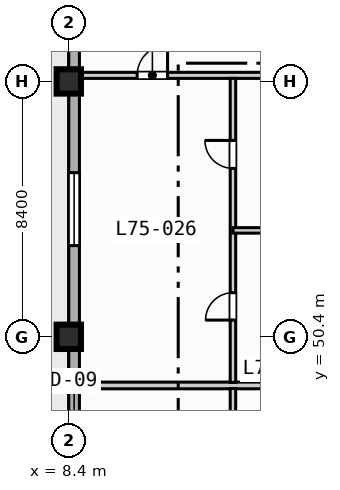
"""IFC4 building model, lengths in metres.
Left out: names, types, materials, properties, quantities, classifications, styles, units other than length and angle.
Written with IfcOpenShell. Run it as: python <this file> out.ifc"""

import sys

from ifc_helpers import new_model, si_unit, direction, frame, frame_2d, origin, origin_2d, place, context, subcontext, project, spatial, rectangle, extrude, element, fill, save


model = new_model("IFC4")
c1 = context("Model", 3, precision=1e-05, world=origin(), true_north=direction((0.0, 1.0)))
c2 = subcontext(c1, "Body", "Model", "MODEL_VIEW")
j1 = project(units=[si_unit("LENGTHUNIT", "METRE"), si_unit("PLANEANGLEUNIT", "RADIAN")], contexts=[c1])
p1 = place(None, origin())
s1 = spatial("IfcSite", under=j1, at=p1, CompositionType="ELEMENT")
p2 = place(p1, origin())
s2 = spatial("IfcBuilding", under=s1, at=p2, CompositionType="ELEMENT")
p3 = place(p2, frame((0.0, 0.0, 304.7)))
s3 = spatial("IfcBuildingStorey", under=s2, at=p3, CompositionType="ELEMENT", Elevation=304.7)
for number, where, z_axis, x_axis in (
    (1, (8.4, 50.4, 0.0), (0.0, 0.0, 1.0), (1.0, 0.0, 0.0)),
    (2, (8.4, 58.8, 0.0), (0.0, 0.0, 1.0), (1.0, 0.0, 0.0)),
):
    element("IfcColumn", number, at=place(p3, frame(where, z_axis=z_axis, x_axis=x_axis)), inside=s3, PredefinedType="COLUMN", context=c2, shape_type="SweptSolid", body=[
        extrude(rectangle(XDim=0.8, YDim=0.8, at=origin_2d()), origin(), (0.0, 0.0, 1.0), 3.9),
    ])
p4 = place(p3, frame((8.575, 11.575, 0.0), z_axis=(0.0, 0.0, 1.0), x_axis=(0.0, 1.0, 0.0)))
e3 = element("IfcWall", 3, at=p4, inside=s3, PredefinedType="STANDARD", context=c2, shape_type="SweptSolid", body=[
    extrude(rectangle(XDim=60.85, YDim=0.35, at=frame_2d((30.425, 0.0))), origin(), (0.0, 0.0, 1.0), 3.67),
])
p5 = place(p4, frame((33.925, 0.0, 0.0)))
e4 = element("IfcOpeningElement", 4, at=p5, cuts=e3, PredefinedType="OPENING", context=c2, shape_type="SweptSolid", body=[
    extrude(rectangle(XDim=1.4, YDim=2.2, at=frame_2d((0.7, 1.1))), frame((0.0, 0.185, 0.0), z_axis=(0.0, -1.0, 0.0), x_axis=(1.0, 0.0, 0.0)), (0.0, 0.0, 1.0), 0.37),
])
p6 = place(p4, frame((25.025, 0.0, 0.85)))
e5 = element("IfcOpeningElement", 5, at=p6, cuts=e3, PredefinedType="OPENING", context=c2, shape_type="SweptSolid", body=[
    extrude(rectangle(XDim=2.4, YDim=1.95, at=frame_2d((1.2, 0.975))), frame((0.0, 0.185, 0.0), z_axis=(0.0, -1.0, 0.0), x_axis=(1.0, 0.0, 0.0)), (0.0, 0.0, 1.0), 0.37),
])
p7 = place(p4, frame((41.825, 0.0, 0.85)))
e6 = element("IfcOpeningElement", 6, at=p7, cuts=e3, PredefinedType="OPENING", context=c2, shape_type="SweptSolid", body=[
    extrude(rectangle(XDim=2.4, YDim=1.95, at=frame_2d((1.2, 0.975))), frame((0.0, 0.185, 0.0), z_axis=(0.0, -1.0, 0.0), x_axis=(1.0, 0.0, 0.0)), (0.0, 0.0, 1.0), 0.37),
])
p8 = place(p3, frame((8.65, 59.0, 0.0), z_axis=(0.0, 0.0, 1.0), x_axis=(1.0, 0.0, 0.0)))
e7 = element("IfcWall", 7, at=p8, inside=s3, PredefinedType="PARTITIONING", context=c2, shape_type="SweptSolid", body=[
    extrude(rectangle(XDim=7.95, YDim=0.2, at=frame_2d((3.975, 0.0))), origin(), (0.0, 0.0, 1.0), 3.127),
])
p9 = place(p8, frame((2.0, 0.0, 0.0)))
e8 = element("IfcOpeningElement", 8, at=p9, cuts=e7, PredefinedType="OPENING", context=c2, shape_type="SweptSolid", body=[
    extrude(rectangle(XDim=1.0, YDim=2.15, at=frame_2d((0.5, 1.075))), frame((0.0, 0.11, 0.0), z_axis=(0.0, -1.0, 0.0), x_axis=(1.0, 0.0, 0.0)), (0.0, 0.0, 1.0), 0.22),
])
p10 = place(p3, frame((8.65, 48.8, 0.0), z_axis=(0.0, 0.0, 1.0), x_axis=(1.0, 0.0, 0.0)))
e9 = element("IfcWall", 9, at=p10, inside=s3, PredefinedType="PARTITIONING", context=c2, shape_type="SweptSolid", body=[
    extrude(rectangle(XDim=7.95, YDim=0.22, at=frame_2d((3.975, 0.0))), origin(), (0.0, 0.0, 1.0), 3.67),
])
p11 = place(p3, frame((13.8, 41.7, 0.0), z_axis=(0.0, 0.0, 1.0), x_axis=(0.0, 1.0, 0.0)))
e10 = element("IfcWall", 10, at=p11, inside=s3, PredefinedType="PLUMBINGWALL", context=c2, shape_type="SweptSolid", body=[
    extrude(rectangle(XDim=7.0, YDim=0.18, at=frame_2d((3.5, 0.0))), origin(), (0.0, 0.0, 1.0), 3.67),
])
p12 = place(p11, frame((1.3, 0.0, 0.0)))
e11 = element("IfcOpeningElement", 11, at=p12, cuts=e10, PredefinedType="OPENING", context=c2, shape_type="SweptSolid", body=[
    extrude(rectangle(XDim=0.9, YDim=2.1, at=frame_2d((0.45, 1.05))), frame((0.0, 0.1, 0.0), z_axis=(0.0, -1.0, 0.0), x_axis=(1.0, 0.0, 0.0)), (0.0, 0.0, 1.0), 0.2),
])
p13 = place(p11, frame((4.79, 0.0, 0.0)))
e12 = element("IfcOpeningElement", 12, at=p13, cuts=e10, PredefinedType="OPENING", context=c2, shape_type="SweptSolid", body=[
    extrude(rectangle(XDim=0.92, YDim=2.1, at=frame_2d((0.46, 1.05))), frame((0.0, 0.1, 0.0), z_axis=(0.0, -1.0, 0.0), x_axis=(1.0, 0.0, 0.0)), (0.0, 0.0, 1.0), 0.2),
])
p14 = place(p3, frame((13.8, 48.9, 0.0), z_axis=(0.0, 0.0, 1.0), x_axis=(0.0, 1.0, 0.0)))
e13 = element("IfcWall", 13, at=p14, inside=s3, PredefinedType="PLUMBINGWALL", context=c2, shape_type="SweptSolid", body=[
    extrude(rectangle(XDim=10.0, YDim=0.18, at=frame_2d((5.0, 0.0))), origin(), (0.0, 0.0, 1.0), 3.67),
])
p15 = place(p14, frame((2.05, 0.0, 0.0)))
e14 = element("IfcOpeningElement", 14, at=p15, cuts=e13, PredefinedType="OPENING", context=c2, shape_type="SweptSolid", body=[
    extrude(rectangle(XDim=0.9, YDim=2.1, at=frame_2d((0.45, 1.05))), frame((0.0, 0.1, 0.0), z_axis=(0.0, -1.0, 0.0), x_axis=(1.0, 0.0, 0.0)), (0.0, 0.0, 1.0), 0.2),
])
p16 = place(p14, frame((7.04, 0.0, 0.0)))
e15 = element("IfcOpeningElement", 15, at=p16, cuts=e13, PredefinedType="OPENING", context=c2, shape_type="SweptSolid", body=[
    extrude(rectangle(XDim=0.92, YDim=2.1, at=frame_2d((0.46, 1.05))), frame((0.0, 0.1, 0.0), z_axis=(0.0, -1.0, 0.0), x_axis=(1.0, 0.0, 0.0)), (0.0, 0.0, 1.0), 0.2),
])
p17 = place(p3, frame((13.8, 53.9, 0.0), z_axis=(0.0, 0.0, 1.0), x_axis=(1.0, 0.0, 0.0)))
e16 = element("IfcWall", 16, at=p17, inside=s3, PredefinedType="PLUMBINGWALL", context=c2, shape_type="SweptSolid", body=[
    extrude(rectangle(XDim=2.8, YDim=0.18, at=frame_2d((1.4, 0.0))), origin(), (0.0, 0.0, 1.0), 3.67),
])
p18 = place(p7, origin())
e17 = element("IfcWindow", 17, at=p18, inside=s3, PartitioningType="SINGLE_PANEL", PredefinedType="WINDOW", context=c2, shape_type="SweptSolid", body=[
    extrude(rectangle(XDim=2.4, YDim=1.95, at=frame_2d((1.2, 0.975))), frame((0.0, 0.03, 0.0), z_axis=(0.0, -1.0, 0.0), x_axis=(1.0, 0.0, 0.0)), (0.0, 0.0, 1.0), 0.06),
])
fill(e6, e17)
p19 = place(p9, origin())
e18 = element("IfcDoor", 18, at=p19, inside=s3, OperationType="SINGLE_SWING_RIGHT", PredefinedType="DOOR", context=c2, shape_type="SweptSolid", body=[
    extrude(rectangle(XDim=1.0, YDim=2.15, at=frame_2d((0.5, 1.075))), frame((0.0, 0.025, 0.0), z_axis=(0.0, -1.0, 0.0), x_axis=(1.0, 0.0, 0.0)), (0.0, 0.0, 1.0), 0.05),
])
fill(e8, e18)
p20 = place(p15, origin())
e19 = element("IfcDoor", 19, at=p20, inside=s3, OperationType="SINGLE_SWING_LEFT", PredefinedType="DOOR", context=c2, shape_type="SweptSolid", body=[
    extrude(rectangle(XDim=0.9, YDim=2.1, at=frame_2d((0.45, 1.05))), frame((0.0, 0.025, 0.0), z_axis=(0.0, -1.0, 0.0), x_axis=(1.0, 0.0, 0.0)), (0.0, 0.0, 1.0), 0.05),
])
fill(e14, e19)
p21 = place(p16, origin())
e20 = element("IfcDoor", 20, at=p21, inside=s3, OperationType="SINGLE_SWING_RIGHT", PredefinedType="DOOR", context=c2, shape_type="SweptSolid", body=[
    extrude(rectangle(XDim=0.92, YDim=2.1, at=frame_2d((0.46, 1.05))), frame((0.0, 0.025, 0.0), z_axis=(0.0, -1.0, 0.0), x_axis=(1.0, 0.0, 0.0)), (0.0, 0.0, 1.0), 0.05),
])
fill(e15, e20)
save(model, sys.argv[1])
